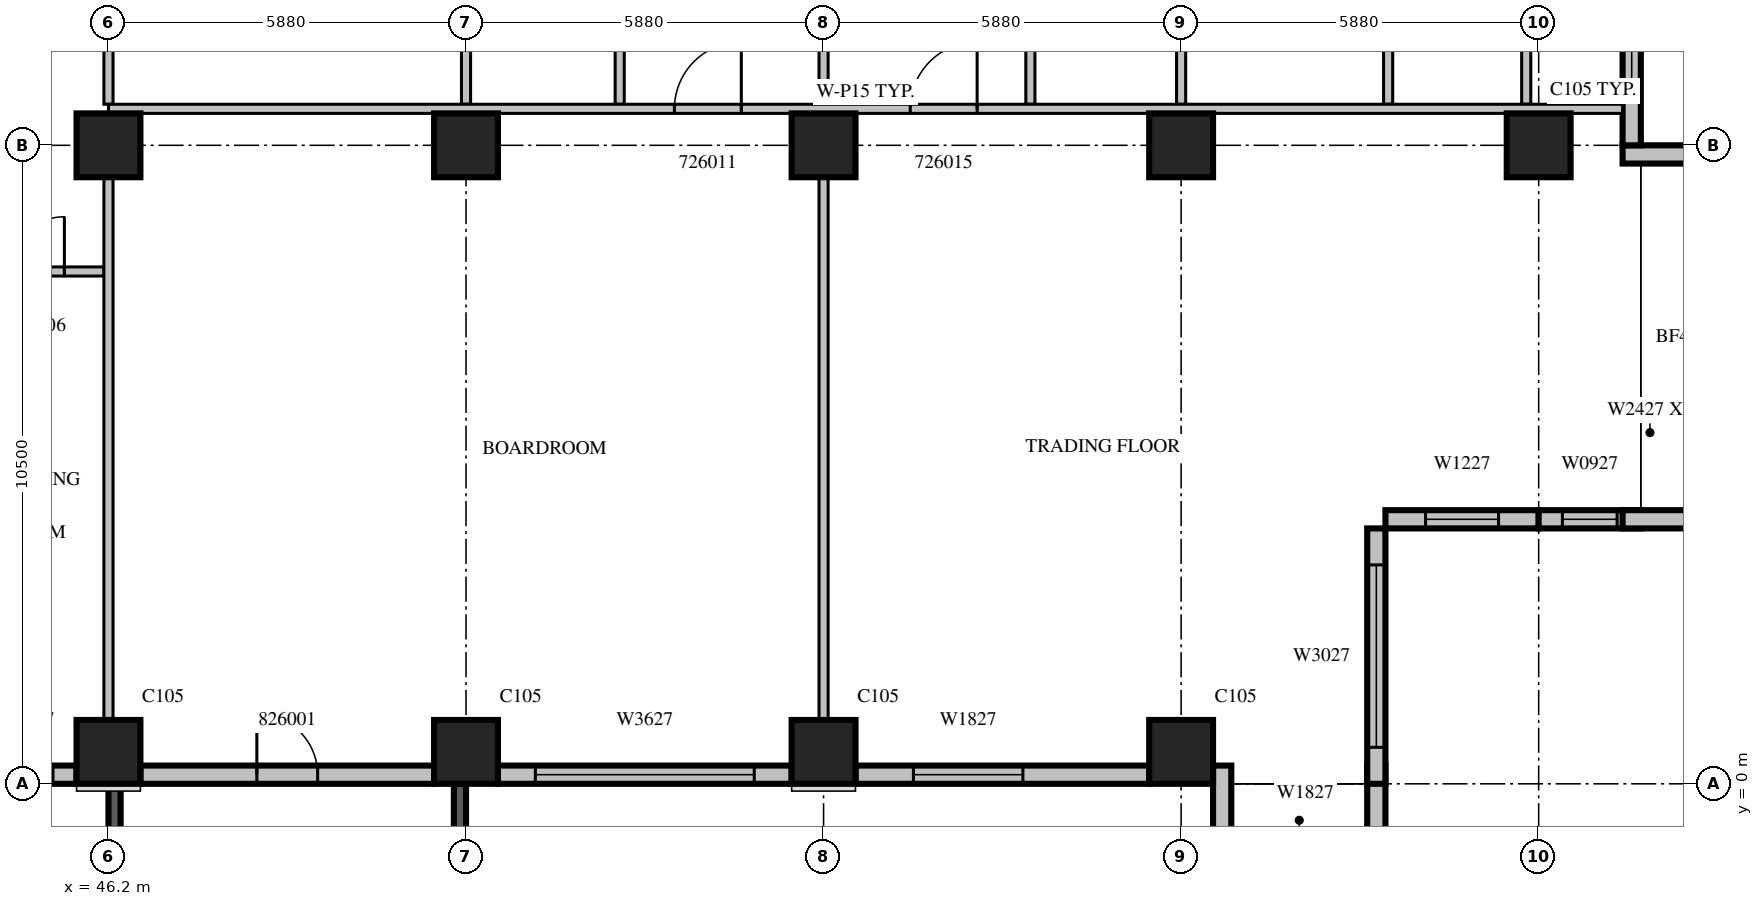
"""IFC4 building model, lengths in metres.
Left out: names, types, materials, properties, quantities, classifications, styles, units other than length and angle.
Written with IfcOpenShell. Run it as: python <this file> out.ifc"""

import sys

from ifc_helpers import new_model, si_unit, direction, frame, frame_2d, origin, origin_2d, place, context, subcontext, project, spatial, rectangle, extrude, source, transform, mapped, element, fill, save


model = new_model("IFC4")
c1 = context("Model", 3, precision=1e-05, world=origin(), true_north=direction((0.0, 1.0)))
c2 = subcontext(c1, "Body", "Model", "MODEL_VIEW")
j1 = project(units=[si_unit("LENGTHUNIT", "METRE"), si_unit("PLANEANGLEUNIT", "RADIAN")], contexts=[c1])
p1 = place(None, origin())
s1 = spatial("IfcSite", under=j1, at=p1, CompositionType="ELEMENT")
p2 = place(p1, origin())
s2 = spatial("IfcBuilding", under=s1, at=p2, CompositionType="ELEMENT")
p3 = place(p2, frame((0.0, 0.0, 120.3)))
s3 = spatial("IfcBuildingStorey", under=s2, at=p3, CompositionType="ELEMENT", Elevation=120.3)
m1 = source(origin(), c2, "Body", "SweptSolid", [
    extrude(rectangle(XDim=1.05, YDim=1.05, at=origin_2d()), origin(), (0.0, 0.0, 1.0), 4.2),
])
for number, where, z_axis, x_axis in (
    (1, (46.2, 0.525, 0.0), (0.0, 0.0, 1.0), (1.0, 0.0, 0.0)),
    (2, (52.08, 0.525, 0.0), (0.0, 0.0, 1.0), (1.0, 0.0, 0.0)),
    (3, (57.96, 0.525, 0.0), (0.0, 0.0, 1.0), (1.0, 0.0, 0.0)),
    (4, (63.84, 0.525, 0.0), (0.0, 0.0, 1.0), (1.0, 0.0, 0.0)),
    (5, (46.2, 10.5, 0.0), (0.0, 0.0, 1.0), (1.0, 0.0, 0.0)),
    (6, (52.08, 10.5, 0.0), (0.0, 0.0, 1.0), (1.0, 0.0, 0.0)),
    (7, (57.96, 10.5, 0.0), (0.0, 0.0, 1.0), (1.0, 0.0, 0.0)),
    (8, (63.84, 10.5, 0.0), (0.0, 0.0, 1.0), (1.0, 0.0, 0.0)),
    (9, (69.72, 10.5, 0.0), (0.0, 0.0, 1.0), (1.0, 0.0, 0.0)),
):
    element("IfcColumn", number, at=place(p3, frame(where, z_axis=z_axis, x_axis=x_axis)), inside=s3, PredefinedType="COLUMN", context=c2, shape_type="MappedRepresentation", body=[
        mapped(m1, transform((0.0, 0.0, 0.0), scale=1.0)),
    ])
m2 = source(origin(), c2, "Body", "SweptSolid", [
    extrude(rectangle(XDim=1.675, YDim=0.3, at=frame_2d((0.838, 0.0))), origin(), (0.0, 0.0, 1.0), 3.8),
])
p4 = place(p3, frame((44.0, 0.15, 0.0), z_axis=(0.0, 0.0, 1.0), x_axis=(1.0, 0.0, 0.0)))
e10 = element("IfcWall", 10, at=p4, inside=s3, PredefinedType="STANDARD", context=c2, shape_type="MappedRepresentation", body=[
    mapped(m2, transform((0.0, 0.0, 0.0), scale=1.0)),
])
m3 = source(origin(), c2, "Body", "SweptSolid", [
    extrude(rectangle(XDim=0.9, YDim=2.7, at=frame_2d((0.45, 1.35))), frame((0.0, 0.16, 0.0), z_axis=(0.0, -1.0, 0.0), x_axis=(1.0, 0.0, 0.0)), (0.0, 0.0, 1.0), 0.32),
])
p5 = place(p4, frame((0.388, 0.0, 0.6)))
e11 = element("IfcOpeningElement", 11, at=p5, cuts=e10, PredefinedType="OPENING", context=c2, shape_type="MappedRepresentation", body=[
    mapped(m3, transform((0.0, 0.0, 0.0), scale=1.0)),
])
m4 = source(origin(), c2, "Body", "SweptSolid", [
    extrude(rectangle(XDim=4.83, YDim=0.3, at=frame_2d((2.415, 0.0))), origin(), (0.0, 0.0, 1.0), 3.8),
])
p6 = place(p3, frame((46.725, 0.15, 0.0), z_axis=(0.0, 0.0, 1.0), x_axis=(1.0, 0.0, 0.0)))
e12 = element("IfcWall", 12, at=p6, inside=s3, PredefinedType="STANDARD", context=c2, shape_type="MappedRepresentation", body=[
    mapped(m4, transform((0.0, 0.0, 0.0), scale=1.0)),
])
m5 = source(origin(), c2, "Body", "SweptSolid", [
    extrude(rectangle(XDim=1.0, YDim=2.1, at=frame_2d((0.5, 1.05))), frame((0.0, 0.16, 0.0), z_axis=(0.0, -1.0, 0.0), x_axis=(1.0, 0.0, 0.0)), (0.0, 0.0, 1.0), 0.32),
])
p7 = place(p6, frame((1.915, 0.0, 0.0)))
e13 = element("IfcOpeningElement", 13, at=p7, cuts=e12, PredefinedType="OPENING", context=c2, shape_type="MappedRepresentation", body=[
    mapped(m5, transform((0.0, 0.0, 0.0), scale=1.0)),
])
p8 = place(p3, frame((52.605, 0.15, 0.0), z_axis=(0.0, 0.0, 1.0), x_axis=(1.0, 0.0, 0.0)))
e14 = element("IfcWall", 14, at=p8, inside=s3, PredefinedType="STANDARD", context=c2, shape_type="MappedRepresentation", body=[
    mapped(m4, transform((0.0, 0.0, 0.0), scale=1.0)),
])
m6 = source(origin(), c2, "Body", "SweptSolid", [
    extrude(rectangle(XDim=3.6, YDim=2.7, at=frame_2d((1.8, 1.35))), frame((0.0, 0.16, 0.0), z_axis=(0.0, -1.0, 0.0), x_axis=(1.0, 0.0, 0.0)), (0.0, 0.0, 1.0), 0.32),
])
p9 = place(p8, frame((0.615, 0.0, 0.6)))
e15 = element("IfcOpeningElement", 15, at=p9, cuts=e14, PredefinedType="OPENING", context=c2, shape_type="MappedRepresentation", body=[
    mapped(m6, transform((0.0, 0.0, 0.0), scale=1.0)),
])
p10 = place(p3, frame((58.485, 0.15, 0.0), z_axis=(0.0, 0.0, 1.0), x_axis=(1.0, 0.0, 0.0)))
e16 = element("IfcWall", 16, at=p10, inside=s3, PredefinedType="STANDARD", context=c2, shape_type="MappedRepresentation", body=[
    mapped(m4, transform((0.0, 0.0, 0.0), scale=1.0)),
])
m7 = source(origin(), c2, "Body", "SweptSolid", [
    extrude(rectangle(XDim=1.8, YDim=2.7, at=frame_2d((0.9, 1.35))), frame((0.0, 0.16, 0.0), z_axis=(0.0, -1.0, 0.0), x_axis=(1.0, 0.0, 0.0)), (0.0, 0.0, 1.0), 0.32),
])
p11 = place(p10, frame((0.953, 0.0, 0.6)))
e17 = element("IfcOpeningElement", 17, at=p11, cuts=e16, PredefinedType="OPENING", context=c2, shape_type="MappedRepresentation", body=[
    mapped(m7, transform((0.0, 0.0, 0.0), scale=1.0)),
])
m8 = source(origin(), c2, "Body", "SweptSolid", [
    extrude(rectangle(XDim=1.2, YDim=0.3, at=frame_2d((0.6, 0.0))), origin(), (0.0, 0.0, 1.0), 3.8),
])
for number, where, z_axis, x_axis in (
    (18, (64.515, 0.3, 0.0), (0.0, 0.0, 1.0), (0.0, -1.0, 0.0)),
    (19, (67.05, 0.3, 0.0), (0.0, 0.0, 1.0), (0.0, -1.0, 0.0)),
):
    element("IfcWall", number, at=place(p3, frame(where, z_axis=z_axis, x_axis=x_axis)), inside=s3, PredefinedType="STANDARD", context=c2, shape_type="MappedRepresentation", body=[
        mapped(m8, transform((0.0, 0.0, 0.0), scale=1.0)),
    ])
m9 = source(origin(), c2, "Body", "SweptSolid", [
    extrude(rectangle(XDim=4.2, YDim=0.3, at=frame_2d((2.1, 0.0))), origin(), (0.0, 0.0, 1.0), 3.8),
])
p12 = place(p3, frame((67.05, 0.0, 0.0), z_axis=(0.0, 0.0, 1.0), x_axis=(0.0, 1.0, 0.0)))
e20 = element("IfcWall", 20, at=p12, inside=s3, PredefinedType="STANDARD", context=c2, shape_type="MappedRepresentation", body=[
    mapped(m9, transform((0.0, 0.0, 0.0), scale=1.0)),
])
m10 = source(origin(), c2, "Body", "SweptSolid", [
    extrude(rectangle(XDim=3.0, YDim=2.7, at=frame_2d((1.5, 1.35))), frame((0.0, 0.16, 0.0), z_axis=(0.0, -1.0, 0.0), x_axis=(1.0, 0.0, 0.0)), (0.0, 0.0, 1.0), 0.32),
])
p13 = place(p12, frame((0.6, 0.0, 0.6)))
e21 = element("IfcOpeningElement", 21, at=p13, cuts=e20, PredefinedType="OPENING", context=c2, shape_type="MappedRepresentation", body=[
    mapped(m10, transform((0.0, 0.0, 0.0), scale=1.0)),
])
m11 = source(origin(), c2, "Body", "SweptSolid", [
    extrude(rectangle(XDim=2.52, YDim=0.3, at=frame_2d((1.26, 0.0))), origin(), (0.0, 0.0, 1.0), 3.8),
])
p14 = place(p3, frame((67.2, 4.35, 0.0), z_axis=(0.0, 0.0, 1.0), x_axis=(1.0, 0.0, 0.0)))
e22 = element("IfcWall", 22, at=p14, inside=s3, PredefinedType="STANDARD", context=c2, shape_type="MappedRepresentation", body=[
    mapped(m11, transform((0.0, 0.0, 0.0), scale=1.0)),
])
m12 = source(origin(), c2, "Body", "SweptSolid", [
    extrude(rectangle(XDim=1.2, YDim=2.7, at=frame_2d((0.6, 1.35))), frame((0.0, 0.16, 0.0), z_axis=(0.0, -1.0, 0.0), x_axis=(1.0, 0.0, 0.0)), (0.0, 0.0, 1.0), 0.32),
])
p15 = place(p14, frame((0.66, 0.0, 0.6)))
e23 = element("IfcOpeningElement", 23, at=p15, cuts=e22, PredefinedType="OPENING", context=c2, shape_type="MappedRepresentation", body=[
    mapped(m12, transform((0.0, 0.0, 0.0), scale=1.0)),
])
m13 = source(origin(), c2, "Body", "SweptSolid", [
    extrude(rectangle(XDim=1.68, YDim=0.3, at=frame_2d((0.84, 0.0))), origin(), (0.0, 0.0, 1.0), 3.8),
])
p16 = place(p3, frame((69.72, 4.35, 0.0), z_axis=(0.0, 0.0, 1.0), x_axis=(1.0, 0.0, 0.0)))
e24 = element("IfcWall", 24, at=p16, inside=s3, PredefinedType="STANDARD", context=c2, shape_type="MappedRepresentation", body=[
    mapped(m13, transform((0.0, 0.0, 0.0), scale=1.0)),
])
p17 = place(p16, frame((0.39, 0.0, 0.6)))
e25 = element("IfcOpeningElement", 25, at=p17, cuts=e24, PredefinedType="OPENING", context=c2, shape_type="MappedRepresentation", body=[
    mapped(m3, transform((0.0, 0.0, 0.0), scale=1.0)),
])
for number, where, z_axis, x_axis in (
    (26, (71.1, 4.35, 0.0), (0.0, 0.0, 1.0), (1.0, 0.0, 0.0)),
    (27, (71.1, 10.35, 0.0), (0.0, 0.0, 1.0), (1.0, 0.0, 0.0)),
):
    element("IfcWall", number, at=place(p3, frame(where, z_axis=z_axis, x_axis=x_axis)), inside=s3, PredefinedType="STANDARD", context=c2, shape_type="MappedRepresentation", body=[
        mapped(m8, transform((0.0, 0.0, 0.0), scale=1.0)),
    ])
m14 = source(origin(), c2, "Body", "SweptSolid", [
    extrude(rectangle(XDim=6.3, YDim=0.3, at=frame_2d((3.15, 0.0))), origin(), (0.0, 0.0, 1.0), 3.8),
])
p18 = place(p3, frame((71.25, 10.5, 0.0), z_axis=(0.0, 0.0, 1.0), x_axis=(0.0, 1.0, 0.0)))
e28 = element("IfcWall", 28, at=p18, inside=s3, PredefinedType="STANDARD", context=c2, shape_type="MappedRepresentation", body=[
    mapped(m14, transform((0.0, 0.0, 0.0), scale=1.0)),
])
p19 = place(p18, frame((1.025, 0.0, 0.6)))
e29 = element("IfcOpeningElement", 29, at=p19, cuts=e28, PredefinedType="OPENING", context=c2, shape_type="MappedRepresentation", body=[
    mapped(m12, transform((0.0, 0.0, 0.0), scale=1.0)),
])
m15 = source(origin(), c2, "Body", "SweptSolid", [
    extrude(rectangle(XDim=3.9, YDim=0.2, at=frame_2d((1.95, 0.0))), origin(), (0.0, 0.0, 1.0), 3.79),
])
p20 = place(p3, frame((46.3, 0.0, 0.0), z_axis=(0.0, 0.0, 1.0), x_axis=(0.0, -1.0, 0.0)))
e30 = element("IfcWall", 30, at=p20, inside=s3, PredefinedType="SOLIDWALL", context=c2, shape_type="MappedRepresentation", body=[
    mapped(m15, transform((0.0, 0.0, 0.0), scale=1.0)),
])
m16 = source(origin(), c2, "Body", "SweptSolid", [
    extrude(rectangle(XDim=2.4, YDim=2.7, at=frame_2d((1.2, 1.35))), frame((0.0, 0.11, 0.0), z_axis=(0.0, -1.0, 0.0), x_axis=(1.0, 0.0, 0.0)), (0.0, 0.0, 1.0), 0.22),
])
p21 = place(p20, frame((0.75, 0.0, 0.6)))
e31 = element("IfcOpeningElement", 31, at=p21, cuts=e30, PredefinedType="OPENING", context=c2, shape_type="MappedRepresentation", body=[
    mapped(m16, transform((0.0, 0.0, 0.0), scale=1.0)),
])
p22 = place(p3, frame((51.98, 0.0, 0.0), z_axis=(0.0, 0.0, 1.0), x_axis=(0.0, -1.0, 0.0)))
e32 = element("IfcWall", 32, at=p22, inside=s3, PredefinedType="SOLIDWALL", context=c2, shape_type="MappedRepresentation", body=[
    mapped(m15, transform((0.0, 0.0, 0.0), scale=1.0)),
])
p23 = place(p22, frame((0.75, 0.0, 0.6)))
e33 = element("IfcOpeningElement", 33, at=p23, cuts=e32, PredefinedType="OPENING", context=c2, shape_type="MappedRepresentation", body=[
    mapped(m16, transform((0.0, 0.0, 0.0), scale=1.0)),
])
m17 = source(origin(), c2, "Body", "SweptSolid", [
    extrude(rectangle(XDim=2.2, YDim=0.15, at=frame_2d((1.1, 0.0))), origin(), (0.0, 0.0, 1.0), 3.8),
])
p24 = place(p3, frame((46.125, 8.425, 0.0), z_axis=(0.0, 0.0, 1.0), x_axis=(-1.0, 0.0, 0.0)))
e34 = element("IfcWall", 34, at=p24, inside=s3, PredefinedType="PARTITIONING", context=c2, shape_type="MappedRepresentation", body=[
    mapped(m17, transform((0.0, 0.0, 0.0), scale=1.0)),
])
m18 = source(origin(), c2, "Body", "SweptSolid", [
    extrude(rectangle(XDim=0.9, YDim=2.1, at=frame_2d((0.45, 1.05))), frame((0.0, 0.085, 0.0), z_axis=(0.0, -1.0, 0.0), x_axis=(1.0, 0.0, 0.0)), (0.0, 0.0, 1.0), 0.17),
])
p25 = place(p24, frame((0.65, 0.0, 0.0)))
e35 = element("IfcOpeningElement", 35, at=p25, cuts=e34, PredefinedType="OPENING", context=c2, shape_type="MappedRepresentation", body=[
    mapped(m18, transform((0.0, 0.0, 0.0), scale=1.0)),
])
m19 = source(origin(), c2, "Body", "SweptSolid", [
    extrude(rectangle(XDim=3.825, YDim=0.15, at=frame_2d((1.913, 0.0))), origin(), (0.0, 0.0, 1.0), 3.8),
])
for number, where, z_axis, x_axis in (
    (36, (52.08, 11.175, 0.0), (0.0, 0.0, 1.0), (0.0, 1.0, 0.0)),
    (37, (54.607, 11.175, 0.0), (0.0, 0.0, 1.0), (0.0, 1.0, 0.0)),
    (38, (61.361, 11.175, 0.0), (0.0, 0.0, 1.0), (0.0, 1.0, 0.0)),
    (39, (63.84, 11.175, 0.0), (0.0, 0.0, 1.0), (0.0, 1.0, 0.0)),
    (40, (67.244, 11.175, 0.0), (0.0, 0.0, 1.0), (0.0, 1.0, 0.0)),
    (41, (69.515, 11.175, 0.0), (0.0, 0.0, 1.0), (0.0, 1.0, 0.0)),
):
    element("IfcWall", number, at=place(p3, frame(where, z_axis=z_axis, x_axis=x_axis)), inside=s3, PredefinedType="PARTITIONING", context=c2, shape_type="MappedRepresentation", body=[
        mapped(m19, transform((0.0, 0.0, 0.0), scale=1.0)),
    ])
m20 = source(origin(), c2, "Body", "SweptSolid", [
    extrude(rectangle(XDim=8.927, YDim=0.15, at=frame_2d((4.463, 0.0))), origin(), (0.0, 0.0, 1.0), 3.8),
])
p26 = place(p3, frame((46.2, 1.049, 0.0), z_axis=(0.0, 0.0, 1.0), x_axis=(0.0, 1.0, 0.0)))
e42 = element("IfcWall", 42, at=p26, inside=s3, PredefinedType="PARTITIONING", context=c2, shape_type="MappedRepresentation", body=[
    mapped(m20, transform((0.0, 0.0, 0.0), scale=1.0)),
])
p27 = place(p3, frame((46.2, 11.175, 0.0), z_axis=(0.0, 0.0, 1.0), x_axis=(0.0, 1.0, 0.0)))
e43 = element("IfcWall", 43, at=p27, inside=s3, PredefinedType="PARTITIONING", context=c2, shape_type="MappedRepresentation", body=[
    mapped(m19, transform((0.0, 0.0, 0.0), scale=1.0)),
])
p28 = place(p3, frame((57.96, 1.049, 0.0), z_axis=(0.0, 0.0, 1.0), x_axis=(0.0, 1.0, 0.0)))
e44 = element("IfcWall", 44, at=p28, inside=s3, PredefinedType="PARTITIONING", context=c2, shape_type="MappedRepresentation", body=[
    mapped(m20, transform((0.0, 0.0, 0.0), scale=1.0)),
])
p29 = place(p3, frame((57.96, 11.175, 0.0), z_axis=(0.0, 0.0, 1.0), x_axis=(0.0, 1.0, 0.0)))
e45 = element("IfcWall", 45, at=p29, inside=s3, PredefinedType="PARTITIONING", context=c2, shape_type="MappedRepresentation", body=[
    mapped(m19, transform((0.0, 0.0, 0.0), scale=1.0)),
])
m21 = source(origin(), c2, "Body", "SweptSolid", [
    extrude(rectangle(XDim=24.9, YDim=0.15, at=frame_2d((12.45, 0.0))), origin(), (0.0, 0.0, 1.0), 3.8),
])
p30 = place(p3, frame((71.1, 11.1, 0.0), z_axis=(0.0, 0.0, 1.0), x_axis=(-1.0, 0.0, 0.0)))
e46 = element("IfcWall", 46, at=p30, inside=s3, PredefinedType="PARTITIONING", context=c2, shape_type="MappedRepresentation", body=[
    mapped(m21, transform((0.0, 0.0, 0.0), scale=1.0)),
])
m22 = source(origin(), c2, "Body", "SweptSolid", [
    extrude(rectangle(XDim=1.1, YDim=2.1, at=frame_2d((0.55, 1.05))), frame((0.0, 0.085, 0.0), z_axis=(0.0, -1.0, 0.0), x_axis=(1.0, 0.0, 0.0)), (0.0, 0.0, 1.0), 0.17),
])
p31 = place(p30, frame((14.493, 0.0, 0.0)))
e47 = element("IfcOpeningElement", 47, at=p31, cuts=e46, PredefinedType="OPENING", context=c2, shape_type="MappedRepresentation", body=[
    mapped(m22, transform((0.0, 0.0, 0.0), scale=1.0)),
])
p32 = place(p30, frame((10.614, 0.0, 0.0)))
e48 = element("IfcOpeningElement", 48, at=p32, cuts=e46, PredefinedType="OPENING", context=c2, shape_type="MappedRepresentation", body=[
    mapped(m22, transform((0.0, 0.0, 0.0), scale=1.0)),
])
m23 = source(origin(), c2, "Body", "SweptSolid", [
    extrude(rectangle(XDim=0.9, YDim=2.7, at=frame_2d((0.45, 1.35))), frame((0.0, 0.03, 0.0), z_axis=(0.0, -1.0, 0.0), x_axis=(1.0, 0.0, 0.0)), (0.0, 0.0, 1.0), 0.06),
])
p33 = place(p5, origin())
e49 = element("IfcWindow", 49, at=p33, inside=s3, PartitioningType="SINGLE_PANEL", PredefinedType="WINDOW", context=c2, shape_type="MappedRepresentation", body=[
    mapped(m23, transform((0.0, 0.0, 0.0), scale=1.0)),
])
fill(e11, e49)
m24 = source(origin(), c2, "Body", "SweptSolid", [
    extrude(rectangle(XDim=3.6, YDim=2.7, at=frame_2d((1.8, 1.35))), frame((0.0, 0.03, 0.0), z_axis=(0.0, -1.0, 0.0), x_axis=(1.0, 0.0, 0.0)), (0.0, 0.0, 1.0), 0.06),
])
p34 = place(p9, origin())
e50 = element("IfcWindow", 50, at=p34, inside=s3, PartitioningType="SINGLE_PANEL", PredefinedType="WINDOW", context=c2, shape_type="MappedRepresentation", body=[
    mapped(m24, transform((0.0, 0.0, 0.0), scale=1.0)),
])
fill(e15, e50)
m25 = source(origin(), c2, "Body", "SweptSolid", [
    extrude(rectangle(XDim=1.8, YDim=2.7, at=frame_2d((0.9, 1.35))), frame((0.0, 0.03, 0.0), z_axis=(0.0, -1.0, 0.0), x_axis=(1.0, 0.0, 0.0)), (0.0, 0.0, 1.0), 0.06),
])
p35 = place(p11, origin())
e51 = element("IfcWindow", 51, at=p35, inside=s3, PartitioningType="SINGLE_PANEL", PredefinedType="WINDOW", context=c2, shape_type="MappedRepresentation", body=[
    mapped(m25, transform((0.0, 0.0, 0.0), scale=1.0)),
])
fill(e17, e51)
m26 = source(origin(), c2, "Body", "SweptSolid", [
    extrude(rectangle(XDim=3.0, YDim=2.7, at=frame_2d((1.5, 1.35))), frame((0.0, 0.03, 0.0), z_axis=(0.0, -1.0, 0.0), x_axis=(1.0, 0.0, 0.0)), (0.0, 0.0, 1.0), 0.06),
])
p36 = place(p13, origin())
e52 = element("IfcWindow", 52, at=p36, inside=s3, PartitioningType="SINGLE_PANEL", PredefinedType="WINDOW", context=c2, shape_type="MappedRepresentation", body=[
    mapped(m26, transform((0.0, 0.0, 0.0), scale=1.0)),
])
fill(e21, e52)
m27 = source(origin(), c2, "Body", "SweptSolid", [
    extrude(rectangle(XDim=1.2, YDim=2.7, at=frame_2d((0.6, 1.35))), frame((0.0, 0.03, 0.0), z_axis=(0.0, -1.0, 0.0), x_axis=(1.0, 0.0, 0.0)), (0.0, 0.0, 1.0), 0.06),
])
p37 = place(p15, origin())
e53 = element("IfcWindow", 53, at=p37, inside=s3, PartitioningType="SINGLE_PANEL", PredefinedType="WINDOW", context=c2, shape_type="MappedRepresentation", body=[
    mapped(m27, transform((0.0, 0.0, 0.0), scale=1.0)),
])
fill(e23, e53)
p38 = place(p17, origin())
e54 = element("IfcWindow", 54, at=p38, inside=s3, PartitioningType="SINGLE_PANEL", PredefinedType="WINDOW", context=c2, shape_type="MappedRepresentation", body=[
    mapped(m23, transform((0.0, 0.0, 0.0), scale=1.0)),
])
fill(e25, e54)
p39 = place(p19, origin())
e55 = element("IfcWindow", 55, at=p39, inside=s3, PartitioningType="SINGLE_PANEL", PredefinedType="WINDOW", context=c2, shape_type="MappedRepresentation", body=[
    mapped(m27, transform((0.0, 0.0, 0.0), scale=1.0)),
])
fill(e29, e55)
m28 = source(origin(), c2, "Body", "SweptSolid", [
    extrude(rectangle(XDim=0.9, YDim=2.1, at=frame_2d((0.45, 1.05))), frame((0.0, 0.025, 0.0), z_axis=(0.0, -1.0, 0.0), x_axis=(1.0, 0.0, 0.0)), (0.0, 0.0, 1.0), 0.05),
])
p40 = place(p25, origin())
e56 = element("IfcDoor", 56, at=p40, inside=s3, OperationType="SINGLE_SWING_RIGHT", PredefinedType="DOOR", context=c2, shape_type="MappedRepresentation", body=[
    mapped(m28, transform((0.0, 0.0, 0.0), scale=1.0)),
])
fill(e35, e56)
m29 = source(origin(), c2, "Body", "SweptSolid", [
    extrude(rectangle(XDim=1.1, YDim=2.1, at=frame_2d((0.55, 1.05))), frame((0.0, 0.025, 0.0), z_axis=(0.0, -1.0, 0.0), x_axis=(1.0, 0.0, 0.0)), (0.0, 0.0, 1.0), 0.05),
])
p41 = place(p31, origin())
e57 = element("IfcDoor", 57, at=p41, inside=s3, OperationType="SINGLE_SWING_RIGHT", PredefinedType="DOOR", context=c2, shape_type="MappedRepresentation", body=[
    mapped(m29, transform((0.0, 0.0, 0.0), scale=1.0)),
])
fill(e47, e57)
p42 = place(p32, origin())
e58 = element("IfcDoor", 58, at=p42, inside=s3, OperationType="SINGLE_SWING_RIGHT", PredefinedType="DOOR", context=c2, shape_type="MappedRepresentation", body=[
    mapped(m29, transform((0.0, 0.0, 0.0), scale=1.0)),
])
fill(e48, e58)
m30 = source(origin(), c2, "Body", "SweptSolid", [
    extrude(rectangle(XDim=1.0, YDim=2.1, at=frame_2d((0.5, 1.05))), frame((0.0, 0.025, 0.0), z_axis=(0.0, -1.0, 0.0), x_axis=(1.0, 0.0, 0.0)), (0.0, 0.0, 1.0), 0.05),
])
p43 = place(p7, origin())
e59 = element("IfcDoor", 59, at=p43, inside=s3, OperationType="SINGLE_SWING_LEFT", PredefinedType="DOOR", context=c2, shape_type="MappedRepresentation", body=[
    mapped(m30, transform((0.0, 0.0, 0.0), scale=1.0)),
])
fill(e13, e59)
save(model, sys.argv[1])
